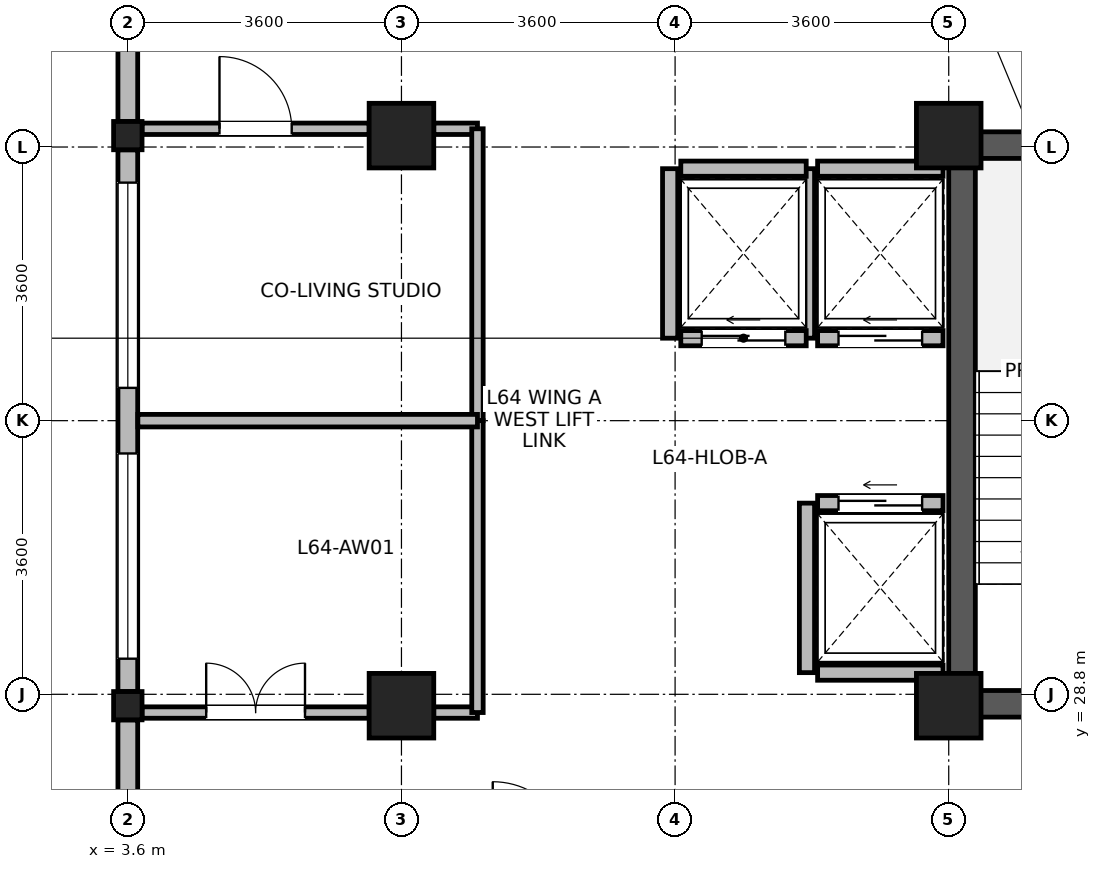
"""IFC4 building model, lengths in metres.
Left out: names, types, materials, properties, quantities, classifications, styles, units other than length and angle.
Written with IfcOpenShell. Run it as: python <this file> out.ifc"""

import sys

from ifc_helpers import new_model, si_unit, direction, frame, frame_2d, origin, origin_2d, place, context, subcontext, project, spatial, rectangle, i_section, extrude, source, transform, mapped, element, fill, save


model = new_model("IFC4")
c1 = context("Model", 3, precision=1e-05, world=origin(), true_north=direction((0.0, 1.0)))
c2 = subcontext(c1, "Body", "Model", "MODEL_VIEW")
j1 = project(units=[si_unit("LENGTHUNIT", "METRE"), si_unit("PLANEANGLEUNIT", "RADIAN")], contexts=[c1])
p1 = place(None, origin())
s1 = spatial("IfcSite", under=j1, at=p1, CompositionType="ELEMENT")
p2 = place(p1, origin())
s2 = spatial("IfcBuilding", under=s1, at=p2, CompositionType="ELEMENT")
p3 = place(p2, frame((0.0, 0.0, 249.9)))
s3 = spatial("IfcBuildingStorey", under=s2, at=p3, CompositionType="ELEMENT", Elevation=249.9)
p4 = place(p3, frame((14.575, 28.5, 0.0), z_axis=(0.0, 0.0, 1.0), x_axis=(0.0, 1.0, 0.0)))
e1 = element("IfcWall", 1, at=p4, inside=s3, PredefinedType="SHEAR", context=c2, shape_type="SweptSolid", body=[
    extrude(rectangle(XDim=7.7, YDim=0.35, at=frame_2d((3.85, 0.0))), origin(), (0.0, 0.0, 1.0), 3.475),
])
for number, where, z_axis, x_axis in (
    (2, (14.75, 28.675, 0.0), (0.0, 0.0, 1.0), (1.0, 0.0, 0.0)),
    (3, (14.75, 36.025, 0.0), (0.0, 0.0, 1.0), (1.0, 0.0, 0.0)),
):
    element("IfcWall", number, at=place(p3, frame(where, z_axis=z_axis, x_axis=x_axis)), inside=s3, PredefinedType="SHEAR", context=c2, shape_type="SweptSolid", body=[
        extrude(rectangle(XDim=3.2, YDim=0.35, at=frame_2d((1.6, 0.0))), origin(), (0.0, 0.0, 1.0), 3.475),
    ])
m1 = source(origin(), c2, "Body", "SweptSolid", [
    extrude(rectangle(XDim=0.85, YDim=0.85, at=origin_2d()), origin(), (0.0, 0.0, 1.0), 3.7),
])
for number, where, z_axis, x_axis in (
    (4, (7.2, 28.65, 0.0), (0.0, 0.0, 1.0), (1.0, 0.0, 0.0)),
    (5, (7.2, 36.15, 0.0), (0.0, 0.0, 1.0), (1.0, 0.0, 0.0)),
    (6, (14.4, 28.65, 0.0), (0.0, 0.0, 1.0), (1.0, 0.0, 0.0)),
    (7, (14.4, 36.15, 0.0), (0.0, 0.0, 1.0), (1.0, 0.0, 0.0)),
):
    element("IfcColumn", number, at=place(p3, frame(where, z_axis=z_axis, x_axis=x_axis)), inside=s3, PredefinedType="COLUMN", context=c2, shape_type="MappedRepresentation", body=[
        mapped(m1, transform((0.0, 0.0, 0.0), x_axis=(1.0, 0.0, 0.0), y_axis=(0.0, 1.0, 0.0), z_axis=(0.0, 0.0, 1.0), scale=1.0)),
    ])
m2 = source(origin(), c2, "Body", "SweptSolid", [
    extrude(i_section(OverallWidth=0.374, OverallDepth=0.372, WebThickness=0.015, FlangeThickness=0.026, FilletRadius=0.015, at=origin_2d()), origin(), (0.0, 0.0, 1.0), 3.7),
])
for number, where, z_axis, x_axis in (
    (8, (3.6, 28.65, 0.0), (0.0, 0.0, 1.0), (1.0, 0.0, 0.0)),
    (9, (3.6, 36.15, 0.0), (0.0, 0.0, 1.0), (1.0, 0.0, 0.0)),
):
    element("IfcColumn", number, at=place(p3, frame(where, z_axis=z_axis, x_axis=x_axis)), inside=s3, PredefinedType="COLUMN", context=c2, shape_type="MappedRepresentation", body=[
        mapped(m2, transform((0.0, 0.0, 0.0), x_axis=(1.0, 0.0, 0.0), y_axis=(0.0, 1.0, 0.0), z_axis=(0.0, 0.0, 1.0), scale=1.0)),
    ])
p5 = place(p3, frame((3.6, 36.337, 0.0), z_axis=(0.0, 0.0, 1.0), x_axis=(0.0, 1.0, 0.0)))
e10 = element("IfcWall", 10, at=p5, inside=s3, PredefinedType="STANDARD", context=c2, shape_type="SweptSolid", body=[
    extrude(rectangle(XDim=6.993, YDim=0.26, at=frame_2d((3.497, 0.0))), origin(), (0.0, 0.0, 1.0), 3.455),
])
p6 = place(p5, frame((3.895, 0.0, 0.85)))
e11 = element("IfcOpeningElement", 11, at=p6, cuts=e10, PredefinedType="OPENING", context=c2, shape_type="SweptSolid", body=[
    extrude(rectangle(XDim=2.7, YDim=2.05, at=frame_2d((1.35, 1.025))), frame((0.0, 0.14, 0.0), z_axis=(0.0, -1.0, 0.0), x_axis=(1.0, 0.0, 0.0)), (0.0, 0.0, 1.0), 0.28),
])
p7 = place(p5, frame((2.462, 0.0, 0.85)))
e12 = element("IfcOpeningElement", 12, at=p7, cuts=e10, PredefinedType="OPENING", context=c2, shape_type="SweptSolid", body=[
    extrude(rectangle(XDim=0.95, YDim=1.75, at=frame_2d((0.475, 0.875))), frame((0.0, 0.14, 0.0), z_axis=(0.0, -1.0, 0.0), x_axis=(1.0, 0.0, 0.0)), (0.0, 0.0, 1.0), 0.28),
])
p8 = place(p3, frame((3.6, 28.837, 0.0), z_axis=(0.0, 0.0, 1.0), x_axis=(0.0, 1.0, 0.0)))
e13 = element("IfcWall", 13, at=p8, inside=s3, PredefinedType="STANDARD", context=c2, shape_type="SweptSolid", body=[
    extrude(rectangle(XDim=7.126, YDim=0.26, at=frame_2d((3.563, 0.0))), origin(), (0.0, 0.0, 1.0), 3.055),
])
p9 = place(p8, frame((0.431, 0.0, 0.85)))
e14 = element("IfcOpeningElement", 14, at=p9, cuts=e13, PredefinedType="OPENING", context=c2, shape_type="SweptSolid", body=[
    extrude(rectangle(XDim=2.7, YDim=2.05, at=frame_2d((1.35, 1.025))), frame((0.0, 0.14, 0.0), z_axis=(0.0, -1.0, 0.0), x_axis=(1.0, 0.0, 0.0)), (0.0, 0.0, 1.0), 0.28),
])
p10 = place(p8, frame((3.994, 0.0, 0.85)))
e15 = element("IfcOpeningElement", 15, at=p10, cuts=e13, PredefinedType="OPENING", context=c2, shape_type="SweptSolid", body=[
    extrude(rectangle(XDim=2.7, YDim=2.05, at=frame_2d((1.35, 1.025))), frame((0.0, 0.14, 0.0), z_axis=(0.0, -1.0, 0.0), x_axis=(1.0, 0.0, 0.0)), (0.0, 0.0, 1.0), 0.28),
])
p11 = place(p3, frame((3.6, 21.47, 0.0), z_axis=(0.0, 0.0, 1.0), x_axis=(0.0, 1.0, 0.0)))
e16 = element("IfcWall", 16, at=p11, inside=s3, PredefinedType="STANDARD", context=c2, shape_type="SweptSolid", body=[
    extrude(rectangle(XDim=6.993, YDim=0.26, at=frame_2d((3.497, 0.0))), origin(), (0.0, 0.0, 1.0), 3.455),
])
p12 = place(p11, frame((3.021, 0.0, 0.85)))
e17 = element("IfcOpeningElement", 17, at=p12, cuts=e16, PredefinedType="OPENING", context=c2, shape_type="SweptSolid", body=[
    extrude(rectangle(XDim=0.95, YDim=1.75, at=frame_2d((0.475, 0.875))), frame((0.0, 0.14, 0.0), z_axis=(0.0, -1.0, 0.0), x_axis=(1.0, 0.0, 0.0)), (0.0, 0.0, 1.0), 0.28),
])
p13 = place(p3, frame((12.675, 33.485, 0.0), z_axis=(0.0, 0.0, 1.0), x_axis=(1.0, 0.0, 0.0)))
e18 = element("IfcWall", 18, at=p13, inside=s3, PredefinedType="PARTITIONING", context=c2, shape_type="SweptSolid", body=[
    extrude(rectangle(XDim=1.65, YDim=0.2, at=frame_2d((0.825, 0.0))), origin(), (0.0, 0.0, 1.0), 3.455),
])
p14 = place(p13, frame((0.275, 0.0, 0.0)))
e19 = element("IfcOpeningElement", 19, at=p14, cuts=e18, PredefinedType="OPENING", context=c2, shape_type="SweptSolid", body=[
    extrude(rectangle(XDim=1.1, YDim=2.12, at=frame_2d((0.55, 1.06))), frame((0.0, 0.11, 0.0), z_axis=(0.0, -1.0, 0.0), x_axis=(1.0, 0.0, 0.0)), (0.0, 0.0, 1.0), 0.22),
])
p15 = place(p3, frame((12.675, 35.715, 0.0), z_axis=(0.0, 0.0, 1.0), x_axis=(1.0, 0.0, 0.0)))
e20 = element("IfcWall", 20, at=p15, inside=s3, PredefinedType="PARTITIONING", context=c2, shape_type="SweptSolid", body=[
    extrude(rectangle(XDim=1.65, YDim=0.2, at=frame_2d((0.825, 0.0))), origin(), (0.0, 0.0, 1.0), 3.455),
])
p16 = place(p3, frame((12.535, 33.485, 0.0), z_axis=(0.0, 0.0, 1.0), x_axis=(0.0, 1.0, 0.0)))
e21 = element("IfcWall", 21, at=p16, inside=s3, PredefinedType="PARTITIONING", context=c2, shape_type="SweptSolid", body=[
    extrude(rectangle(XDim=2.23, YDim=0.2, at=frame_2d((1.115, 0.0))), origin(), (0.0, 0.0, 1.0), 3.455),
])
p17 = place(p3, frame((12.675, 29.085, 0.0), z_axis=(0.0, 0.0, 1.0), x_axis=(1.0, 0.0, 0.0)))
e22 = element("IfcWall", 22, at=p17, inside=s3, PredefinedType="PARTITIONING", context=c2, shape_type="SweptSolid", body=[
    extrude(rectangle(XDim=1.65, YDim=0.2, at=frame_2d((0.825, 0.0))), origin(), (0.0, 0.0, 1.0), 3.455),
])
p18 = place(p3, frame((12.675, 31.315, 0.0), z_axis=(0.0, 0.0, 1.0), x_axis=(1.0, 0.0, 0.0)))
e23 = element("IfcWall", 23, at=p18, inside=s3, PredefinedType="PARTITIONING", context=c2, shape_type="SweptSolid", body=[
    extrude(rectangle(XDim=1.65, YDim=0.2, at=frame_2d((0.825, 0.0))), origin(), (0.0, 0.0, 1.0), 3.455),
])
p19 = place(p18, frame((0.275, 0.0, 0.0)))
e24 = element("IfcOpeningElement", 24, at=p19, cuts=e23, PredefinedType="OPENING", context=c2, shape_type="SweptSolid", body=[
    extrude(rectangle(XDim=1.1, YDim=2.12, at=frame_2d((0.55, 1.06))), frame((0.0, 0.11, 0.0), z_axis=(0.0, -1.0, 0.0), x_axis=(1.0, 0.0, 0.0)), (0.0, 0.0, 1.0), 0.22),
])
p20 = place(p3, frame((12.535, 29.085, 0.0), z_axis=(0.0, 0.0, 1.0), x_axis=(0.0, 1.0, 0.0)))
e25 = element("IfcWall", 25, at=p20, inside=s3, PredefinedType="PARTITIONING", context=c2, shape_type="SweptSolid", body=[
    extrude(rectangle(XDim=2.23, YDim=0.2, at=frame_2d((1.115, 0.0))), origin(), (0.0, 0.0, 1.0), 3.455),
])
p21 = place(p3, frame((10.875, 33.485, 0.0), z_axis=(0.0, 0.0, 1.0), x_axis=(1.0, 0.0, 0.0)))
e26 = element("IfcWall", 26, at=p21, inside=s3, PredefinedType="PARTITIONING", context=c2, shape_type="SweptSolid", body=[
    extrude(rectangle(XDim=1.65, YDim=0.2, at=frame_2d((0.825, 0.0))), origin(), (0.0, 0.0, 1.0), 3.455),
])
p22 = place(p21, frame((0.275, 0.0, 0.0)))
e27 = element("IfcOpeningElement", 27, at=p22, cuts=e26, PredefinedType="OPENING", context=c2, shape_type="SweptSolid", body=[
    extrude(rectangle(XDim=1.1, YDim=2.12, at=frame_2d((0.55, 1.06))), frame((0.0, 0.11, 0.0), z_axis=(0.0, -1.0, 0.0), x_axis=(1.0, 0.0, 0.0)), (0.0, 0.0, 1.0), 0.22),
])
p23 = place(p3, frame((10.875, 35.715, 0.0), z_axis=(0.0, 0.0, 1.0), x_axis=(1.0, 0.0, 0.0)))
e28 = element("IfcWall", 28, at=p23, inside=s3, PredefinedType="PARTITIONING", context=c2, shape_type="SweptSolid", body=[
    extrude(rectangle(XDim=1.65, YDim=0.2, at=frame_2d((0.825, 0.0))), origin(), (0.0, 0.0, 1.0), 3.455),
])
p24 = place(p3, frame((10.735, 33.485, 0.0), z_axis=(0.0, 0.0, 1.0), x_axis=(0.0, 1.0, 0.0)))
e29 = element("IfcWall", 29, at=p24, inside=s3, PredefinedType="PARTITIONING", context=c2, shape_type="SweptSolid", body=[
    extrude(rectangle(XDim=2.23, YDim=0.2, at=frame_2d((1.115, 0.0))), origin(), (0.0, 0.0, 1.0), 3.455),
])
p25 = place(p3, frame((3.787, 28.56, 0.0), z_axis=(0.0, 0.0, 1.0), x_axis=(1.0, 0.0, 0.0)))
e30 = element("IfcWall", 30, at=p25, inside=s3, PredefinedType="PARTITIONING", context=c2, shape_type="SweptSolid", body=[
    extrude(rectangle(XDim=2.988, YDim=0.15, at=frame_2d((1.494, 0.0))), origin(), (0.0, 0.0, 1.0), 2.905),
])
p26 = place(p25, frame((0.844, 0.0, 0.0)))
e31 = element("IfcOpeningElement", 31, at=p26, cuts=e30, PredefinedType="OPENING", context=c2, shape_type="SweptSolid", body=[
    extrude(rectangle(XDim=1.3, YDim=2.12, at=frame_2d((0.65, 1.06))), frame((0.0, 0.085, 0.0), z_axis=(0.0, -1.0, 0.0), x_axis=(1.0, 0.0, 0.0)), (0.0, 0.0, 1.0), 0.17),
])
p27 = place(p3, frame((7.625, 28.56, 0.0), z_axis=(0.0, 0.0, 1.0), x_axis=(1.0, 0.0, 0.0)))
e32 = element("IfcWall", 32, at=p27, inside=s3, PredefinedType="PARTITIONING", context=c2, shape_type="SweptSolid", body=[
    extrude(rectangle(XDim=0.575, YDim=0.15, at=frame_2d((0.288, 0.0))), origin(), (0.0, 0.0, 1.0), 2.905),
])
p28 = place(p3, frame((3.787, 36.24, 0.0), z_axis=(0.0, 0.0, 1.0), x_axis=(1.0, 0.0, 0.0)))
e33 = element("IfcWall", 33, at=p28, inside=s3, PredefinedType="PARTITIONING", context=c2, shape_type="SweptSolid", body=[
    extrude(rectangle(XDim=2.988, YDim=0.15, at=frame_2d((1.494, 0.0))), origin(), (0.0, 0.0, 1.0), 2.905),
])
p29 = place(p28, frame((1.019, 0.0, 0.0)))
e34 = element("IfcOpeningElement", 34, at=p29, cuts=e33, PredefinedType="OPENING", context=c2, shape_type="SweptSolid", body=[
    extrude(rectangle(XDim=0.95, YDim=2.1, at=frame_2d((0.475, 1.05))), frame((0.0, 0.085, 0.0), z_axis=(0.0, -1.0, 0.0), x_axis=(1.0, 0.0, 0.0)), (0.0, 0.0, 1.0), 0.17),
])
p30 = place(p3, frame((7.625, 36.24, 0.0), z_axis=(0.0, 0.0, 1.0), x_axis=(1.0, 0.0, 0.0)))
e35 = element("IfcWall", 35, at=p30, inside=s3, PredefinedType="PARTITIONING", context=c2, shape_type="SweptSolid", body=[
    extrude(rectangle(XDim=0.575, YDim=0.15, at=frame_2d((0.288, 0.0))), origin(), (0.0, 0.0, 1.0), 2.905),
])
p31 = place(p3, frame((8.2, 32.4, 0.0), z_axis=(0.0, 0.0, 1.0), x_axis=(0.0, 1.0, 0.0)))
e36 = element("IfcWall", 36, at=p31, inside=s3, PredefinedType="PARTITIONING", context=c2, shape_type="SweptSolid", body=[
    extrude(rectangle(XDim=3.84, YDim=0.15, at=frame_2d((1.92, 0.0))), origin(), (0.0, 0.0, 1.0), 3.455),
])
p32 = place(p3, frame((8.2, 28.56, 0.0), z_axis=(0.0, 0.0, 1.0), x_axis=(0.0, 1.0, 0.0)))
e37 = element("IfcWall", 37, at=p32, inside=s3, PredefinedType="PARTITIONING", context=c2, shape_type="SweptSolid", body=[
    extrude(rectangle(XDim=3.84, YDim=0.15, at=frame_2d((1.92, 0.0))), origin(), (0.0, 0.0, 1.0), 3.455),
])
p33 = place(p3, frame((3.732, 32.4, 0.0), z_axis=(0.0, 0.0, 1.0), x_axis=(1.0, 0.0, 0.0)))
e38 = element("IfcWall", 38, at=p33, inside=s3, PredefinedType="PARTITIONING", context=c2, shape_type="SweptSolid", body=[
    extrude(rectangle(XDim=4.468, YDim=0.165, at=frame_2d((2.234, 0.0))), origin(), (0.0, 0.0, 1.0), 3.455),
])
p34 = place(p9, origin())
e39 = element("IfcWindow", 39, at=p34, inside=s3, PartitioningType="SINGLE_PANEL", PredefinedType="WINDOW", context=c2, shape_type="SweptSolid", body=[
    extrude(rectangle(XDim=2.7, YDim=2.05, at=frame_2d((1.35, 1.025))), frame((0.0, 0.03, 0.0), z_axis=(0.0, -1.0, 0.0), x_axis=(1.0, 0.0, 0.0)), (0.0, 0.0, 1.0), 0.06),
])
fill(e14, e39)
p35 = place(p10, origin())
e40 = element("IfcWindow", 40, at=p35, inside=s3, PartitioningType="SINGLE_PANEL", PredefinedType="WINDOW", context=c2, shape_type="SweptSolid", body=[
    extrude(rectangle(XDim=2.7, YDim=2.05, at=frame_2d((1.35, 1.025))), frame((0.0, 0.03, 0.0), z_axis=(0.0, -1.0, 0.0), x_axis=(1.0, 0.0, 0.0)), (0.0, 0.0, 1.0), 0.06),
])
fill(e15, e40)
p36 = place(p14, origin())
e41 = element("IfcDoor", 41, at=p36, inside=s3, OperationType="SLIDING_TO_LEFT", PredefinedType="DOOR", context=c2, shape_type="SweptSolid", body=[
    extrude(rectangle(XDim=1.1, YDim=2.12, at=frame_2d((0.55, 1.06))), frame((0.0, 0.025, 0.0), z_axis=(0.0, -1.0, 0.0), x_axis=(1.0, 0.0, 0.0)), (0.0, 0.0, 1.0), 0.05),
])
fill(e19, e41)
p37 = place(p19, origin())
e42 = element("IfcDoor", 42, at=p37, inside=s3, OperationType="SLIDING_TO_LEFT", PredefinedType="DOOR", context=c2, shape_type="SweptSolid", body=[
    extrude(rectangle(XDim=1.1, YDim=2.12, at=frame_2d((0.55, 1.06))), frame((0.0, 0.025, 0.0), z_axis=(0.0, -1.0, 0.0), x_axis=(1.0, 0.0, 0.0)), (0.0, 0.0, 1.0), 0.05),
])
fill(e24, e42)
p38 = place(p22, origin())
e43 = element("IfcDoor", 43, at=p38, inside=s3, OperationType="SLIDING_TO_LEFT", PredefinedType="DOOR", context=c2, shape_type="SweptSolid", body=[
    extrude(rectangle(XDim=1.1, YDim=2.12, at=frame_2d((0.55, 1.06))), frame((0.0, 0.025, 0.0), z_axis=(0.0, -1.0, 0.0), x_axis=(1.0, 0.0, 0.0)), (0.0, 0.0, 1.0), 0.05),
])
fill(e27, e43)
p39 = place(p26, origin())
e44 = element("IfcDoor", 44, at=p39, inside=s3, OperationType="DOUBLE_DOOR_SINGLE_SWING", PredefinedType="DOOR", context=c2, shape_type="SweptSolid", body=[
    extrude(rectangle(XDim=1.3, YDim=2.12, at=frame_2d((0.65, 1.06))), frame((0.0, 0.025, 0.0), z_axis=(0.0, -1.0, 0.0), x_axis=(1.0, 0.0, 0.0)), (0.0, 0.0, 1.0), 0.05),
])
fill(e31, e44)
p40 = place(p29, origin())
e45 = element("IfcDoor", 45, at=p40, inside=s3, OperationType="SINGLE_SWING_LEFT", PredefinedType="DOOR", context=c2, shape_type="SweptSolid", body=[
    extrude(rectangle(XDim=0.95, YDim=2.1, at=frame_2d((0.475, 1.05))), frame((0.0, 0.025, 0.0), z_axis=(0.0, -1.0, 0.0), x_axis=(1.0, 0.0, 0.0)), (0.0, 0.0, 1.0), 0.05),
])
fill(e34, e45)
save(model, sys.argv[1])
